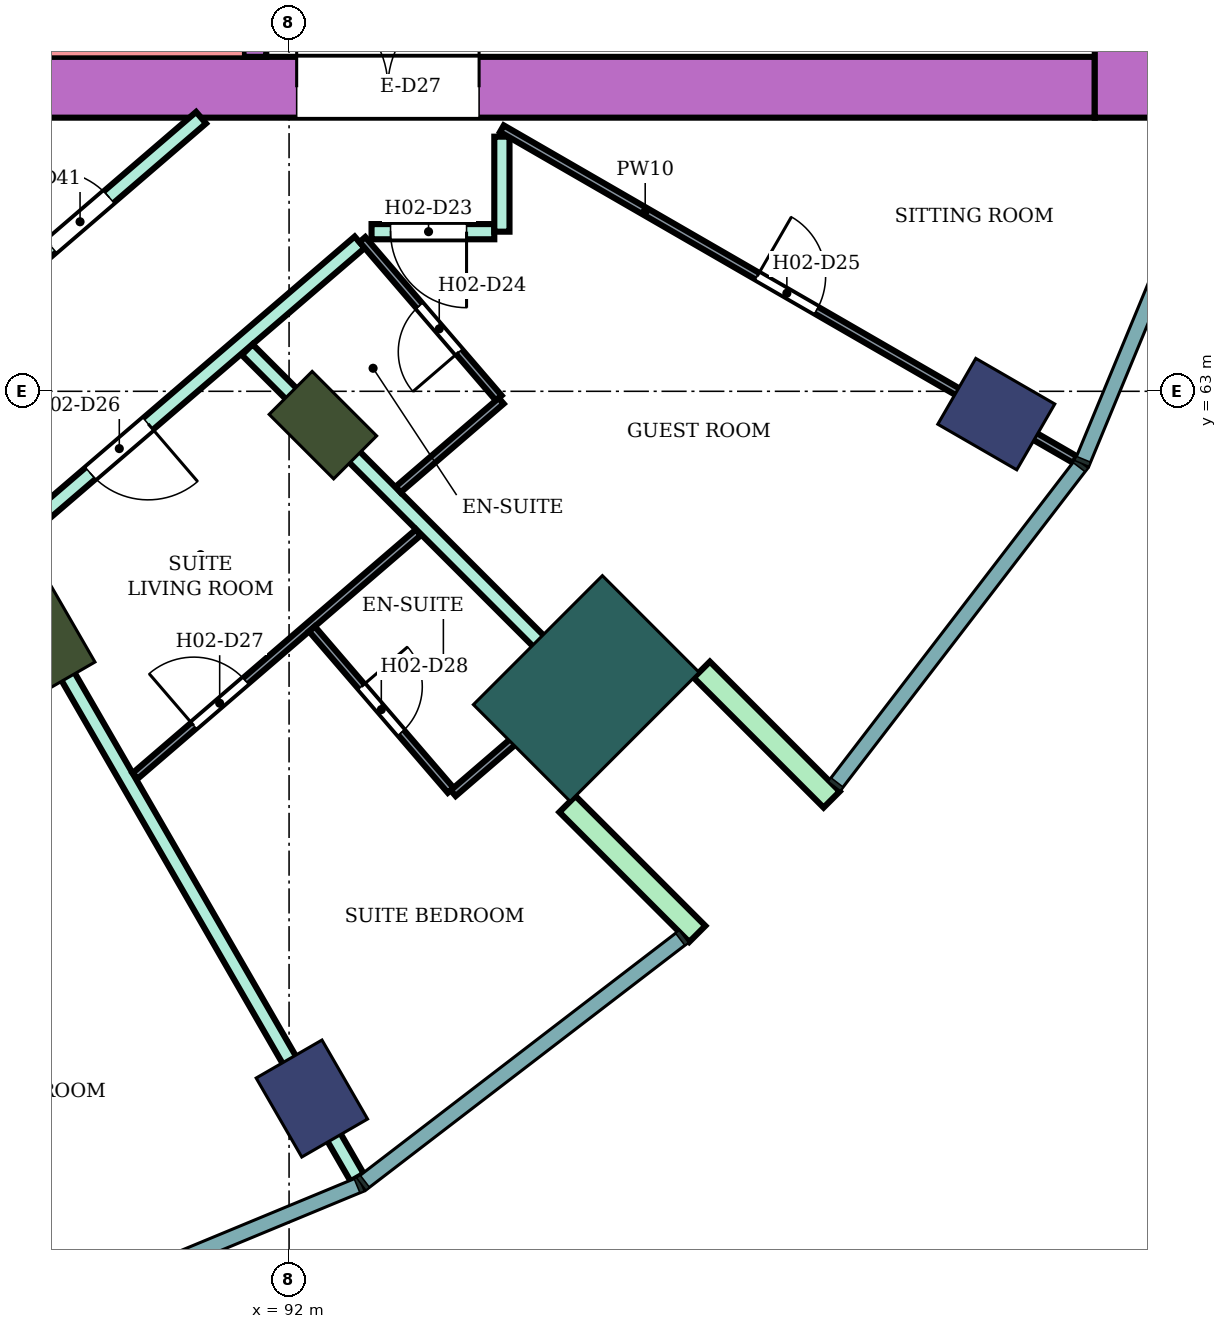
"""IFC4 building model, lengths in metres.
Left out: names, types, materials, properties, quantities, classifications, styles, units other than length and angle.
Written with IfcOpenShell. Run it as: python <this file> out.ifc"""

import sys

from ifc_helpers import new_model, si_unit, direction, frame, frame_2d, origin, origin_2d, place, context, subcontext, project, spatial, rectangle, extrude, element, fill, save


model = new_model("IFC4")
c1 = context("Model", 3, precision=1e-05, world=origin(), true_north=direction((0.0, 1.0)))
c2 = subcontext(c1, "Body", "Model", "MODEL_VIEW")
j1 = project(units=[si_unit("LENGTHUNIT", "METRE"), si_unit("PLANEANGLEUNIT", "RADIAN")], contexts=[c1])
p1 = place(None, origin())
s1 = spatial("IfcSite", under=j1, at=p1, CompositionType="ELEMENT")
p2 = place(p1, origin())
s2 = spatial("IfcBuilding", under=s1, at=p2, CompositionType="ELEMENT")
p3 = place(p2, frame((0.0, 0.0, 47.8)))
s3 = spatial("IfcBuildingStorey", under=s2, at=p3, CompositionType="ELEMENT", Elevation=47.8)
for number, where, z_axis, x_axis in (
    (1, (92.3, 53.696, 0.0), (0.0, 0.0, 1.0), (0.5, -0.866, 0.0)),
    (2, (101.304, 62.7, 0.0), (0.0, 0.0, 1.0), (0.866, -0.5, 0.0)),
):
    element("IfcColumn", number, at=place(p3, frame(where, z_axis=z_axis, x_axis=x_axis)), inside=s3, PredefinedType="COLUMN", context=c2, shape_type="SweptSolid", body=[
        extrude(rectangle(XDim=1.2, YDim=1.0, at=origin_2d()), origin(), (0.0, 0.0, 1.0), 3.8),
    ])
for number, where, z_axis, x_axis in (
    (3, (88.8, 59.758, 0.0), (0.0, 0.0, 1.0), (0.5, -0.866, 0.0)),
    (4, (92.445, 62.555, 0.0), (0.0, 0.0, 1.0), (0.707, -0.707, 0.0)),
):
    element("IfcColumn", number, at=place(p3, frame(where, z_axis=z_axis, x_axis=x_axis)), inside=s3, PredefinedType="COLUMN", context=c2, shape_type="SweptSolid", body=[
        extrude(rectangle(XDim=1.2, YDim=0.8, at=origin_2d()), origin(), (0.0, 0.0, 1.0), 3.8),
    ])
p4 = place(p3, frame((95.91, 59.09, 0.0), z_axis=(0.0, 0.0, 1.0), x_axis=(0.707106781187, -0.707106781187, 0.0)))
e5 = element("IfcColumn", 5, at=p4, inside=s3, PredefinedType="COLUMN", context=c2, shape_type="SweptSolid", body=[
    extrude(rectangle(XDim=1.8, YDim=2.4, at=origin_2d()), origin(), (0.0, 0.0, 1.0), 3.8),
])
p5 = place(p3, frame((87.9, 67.0, 0.0), z_axis=(0.0, 0.0, 1.0), x_axis=(1.0, 0.0, 0.0)))
e6 = element("IfcWall", 6, at=p5, inside=s3, PredefinedType="SHEAR", context=c2, shape_type="SweptSolid", body=[
    extrude(rectangle(XDim=14.7, YDim=0.8, at=frame_2d((7.35, 0.0))), origin(), (0.0, 0.0, 1.0), 3.48),
])
p6 = place(p5, frame((4.2, 0.0, 0.0)))
e7 = element("IfcOpeningElement", 7, at=p6, cuts=e6, PredefinedType="OPENING", context=c2, shape_type="SweptSolid", body=[
    extrude(rectangle(XDim=2.4, YDim=2.4, at=frame_2d((1.2, 1.2))), frame((0.0, 0.41, 0.0), z_axis=(0.0, -1.0, 0.0), x_axis=(1.0, 0.0, 0.0)), (0.0, 0.0, 1.0), 0.82),
])
p7 = place(p3, frame((103.0, 66.6, 0.0), z_axis=(0.0, 0.0, 1.0), x_axis=(0.0, 1.0, 0.0)))
e8 = element("IfcWall", 8, at=p7, inside=s3, PredefinedType="SHEAR", context=c2, shape_type="SweptSolid", body=[
    extrude(rectangle(XDim=16.8, YDim=0.8, at=frame_2d((8.4, 0.0))), origin(), (0.0, 0.0, 1.0), 3.48),
])
p8 = place(p3, frame((91.55, 67.4, 0.0), z_axis=(0.0, 0.0, 1.0), x_axis=(0.0, 1.0, 0.0)))
e9 = element("IfcWall", 9, at=p8, inside=s3, PredefinedType="SHEAR", context=c2, shape_type="SweptSolid", body=[
    extrude(rectangle(XDim=7.6, YDim=0.3, at=frame_2d((3.8, 0.0))), origin(), (0.0, 0.0, 1.0), 3.48),
])
p9 = place(p8, frame((0.25, 0.0, 0.0)))
e10 = element("IfcOpeningElement", 10, at=p9, cuts=e9, PredefinedType="OPENING", context=c2, shape_type="SweptSolid", body=[
    extrude(rectangle(XDim=0.9, YDim=2.1, at=frame_2d((0.45, 1.05))), frame((0.0, 0.16, 0.0), z_axis=(0.0, -1.0, 0.0), x_axis=(1.0, 0.0, 0.0)), (0.0, 0.0, 1.0), 0.32),
])
for number, where, z_axis, x_axis in (
    (11, (95.662, 57.57, 0.0), (0.0, 0.0, 1.0), (0.707, -0.707, 0.0)),
    (12, (97.43, 59.338, 0.0), (0.0, 0.0, 1.0), (0.707, -0.707, 0.0)),
):
    element("IfcWall", number, at=place(p3, frame(where, z_axis=z_axis, x_axis=x_axis)), inside=s3, PredefinedType="NOTDEFINED", context=c2, shape_type="SweptSolid", body=[
        extrude(rectangle(XDim=2.416, YDim=0.3, at=frame_2d((1.208, 0.0))), origin(), (0.0, 0.0, 1.0), 3.8),
    ])
p10 = place(p3, frame((86.877, 63.189, 0.0), z_axis=(0.0, 0.0, 1.0), x_axis=(0.758164888471, 0.652062881853, 0.0)))
e13 = element("IfcWall", 13, at=p10, inside=s3, PredefinedType="PARTITIONING", context=c2, shape_type="SweptSolid", body=[
    extrude(rectangle(XDim=5.23, YDim=0.2, at=frame_2d((2.615, 0.0))), origin(), (0.0, 0.0, 1.0), 3.35),
])
p11 = place(p10, frame((2.63, 0.0, 0.0)))
e14 = element("IfcOpeningElement", 14, at=p11, cuts=e13, PredefinedType="OPENING", context=c2, shape_type="SweptSolid", body=[
    extrude(rectangle(XDim=1.0, YDim=2.1, at=frame_2d((0.5, 1.05))), frame((0.0, 0.11, 0.0), z_axis=(0.0, -1.0, 0.0), x_axis=(1.0, 0.0, 0.0)), (0.0, 0.0, 1.0), 0.22),
])
p12 = place(p3, frame((88.235, 60.931, 0.0), z_axis=(0.0, 0.0, 1.0), x_axis=(0.758799498714, 0.651324282329, 0.0)))
e15 = element("IfcWall", 15, at=p12, inside=s3, PredefinedType="PARTITIONING", context=c2, shape_type="SweptSolid", body=[
    extrude(rectangle(XDim=6.186, YDim=0.2, at=frame_2d((3.093, 0.0))), origin(), (0.0, 0.0, 1.0), 3.35),
])
p13 = place(p12, frame((1.519, 0.0, 0.0)))
e16 = element("IfcOpeningElement", 16, at=p13, cuts=e15, PredefinedType="OPENING", context=c2, shape_type="SweptSolid", body=[
    extrude(rectangle(XDim=1.0, YDim=2.1, at=frame_2d((0.5, 1.05))), frame((0.0, 0.11, 0.0), z_axis=(0.0, -1.0, 0.0), x_axis=(1.0, 0.0, 0.0)), (0.0, 0.0, 1.0), 0.22),
])
p14 = place(p3, frame((88.159, 60.863, 0.0), z_axis=(0.0, 0.0, 1.0), x_axis=(0.499897184548, -0.866084756177, 0.0)))
e17 = element("IfcWall", 17, at=p14, inside=s3, PredefinedType="PARTITIONING", context=c2, shape_type="SweptSolid", body=[
    extrude(rectangle(XDim=9.475, YDim=0.2, at=frame_2d((4.737, 0.0))), origin(), (0.0, 0.0, 1.0), 3.35),
])
p15 = place(p3, frame((91.449, 63.548, 0.0), z_axis=(0.0, 0.0, 1.0), x_axis=(0.706984810649, -0.707228730688, 0.0)))
e18 = element("IfcWall", 18, at=p15, inside=s3, PredefinedType="PARTITIONING", context=c2, shape_type="SweptSolid", body=[
    extrude(rectangle(XDim=7.006, YDim=0.2, at=frame_2d((3.503, 0.0))), origin(), (0.0, 0.0, 1.0), 3.35),
])
p16 = place(p3, frame((93.085, 65.1, 0.0), z_axis=(0.0, 0.0, 1.0), x_axis=(1.0, 0.0, 0.0)))
e19 = element("IfcWall", 19, at=p16, inside=s3, PredefinedType="PARTITIONING", context=c2, shape_type="SweptSolid", body=[
    extrude(rectangle(XDim=1.615, YDim=0.2, at=frame_2d((0.808, 0.0))), origin(), (0.0, 0.0, 1.0), 3.35),
])
p17 = place(p16, frame((0.25, 0.0, 0.0)))
e20 = element("IfcOpeningElement", 20, at=p17, cuts=e19, PredefinedType="OPENING", context=c2, shape_type="SweptSolid", body=[
    extrude(rectangle(XDim=1.0, YDim=2.1, at=frame_2d((0.5, 1.05))), frame((0.0, 0.11, 0.0), z_axis=(0.0, -1.0, 0.0), x_axis=(1.0, 0.0, 0.0)), (0.0, 0.0, 1.0), 0.22),
])
p18 = place(p3, frame((94.8, 65.1, 0.0), z_axis=(0.0, 0.0, 1.0), x_axis=(0.0, 1.0, 0.0)))
e21 = element("IfcWall", 21, at=p18, inside=s3, PredefinedType="PARTITIONING", context=c2, shape_type="SweptSolid", body=[
    extrude(rectangle(XDim=1.25, YDim=0.2, at=frame_2d((0.625, 0.0))), origin(), (0.0, 0.0, 1.0), 3.35),
])
p19 = place(p3, frame((89.974, 57.94, 0.0), z_axis=(0.0, 0.0, 1.0), x_axis=(0.75821417454, 0.652005571699, 0.0)))
e22 = element("IfcWall", 22, at=p19, inside=s3, PredefinedType="PARTITIONING", context=c2, shape_type="SweptSolid", body=[
    extrude(rectangle(XDim=4.915, YDim=0.1, at=frame_2d((2.457, 0.0))), origin(), (0.0, 0.0, 1.0), 3.35),
])
p20 = place(p19, frame((1.017, 0.0, 0.0)))
e23 = element("IfcOpeningElement", 23, at=p20, cuts=e22, PredefinedType="OPENING", context=c2, shape_type="SweptSolid", body=[
    extrude(rectangle(XDim=0.9, YDim=2.1, at=frame_2d((0.45, 1.05))), frame((0.0, 0.06, 0.0), z_axis=(0.0, -1.0, 0.0), x_axis=(1.0, 0.0, 0.0)), (0.0, 0.0, 1.0), 0.12),
])
p21 = place(p3, frame((92.301, 59.874, 0.0), z_axis=(0.0, 0.0, 1.0), x_axis=(0.652061320562, -0.758166231262, 0.0)))
e24 = element("IfcWall", 24, at=p21, inside=s3, PredefinedType="PARTITIONING", context=c2, shape_type="SweptSolid", body=[
    extrude(rectangle(XDim=2.8, YDim=0.1, at=frame_2d((1.4, 0.0))), origin(), (0.0, 0.0, 1.0), 3.35),
])
p22 = place(p21, frame((1.0, 0.0, 0.0)))
e25 = element("IfcOpeningElement", 25, at=p22, cuts=e24, PredefinedType="OPENING", context=c2, shape_type="SweptSolid", body=[
    extrude(rectangle(XDim=0.8, YDim=2.1, at=frame_2d((0.4, 1.05))), frame((0.0, 0.06, 0.0), z_axis=(0.0, -1.0, 0.0), x_axis=(1.0, 0.0, 0.0)), (0.0, 0.0, 1.0), 0.12),
])
p23 = place(p3, frame((92.965, 64.997, 0.0), z_axis=(0.0, 0.0, 1.0), x_axis=(0.652069888227, -0.758158862553, 0.0)))
e26 = element("IfcWall", 26, at=p23, inside=s3, PredefinedType="PARTITIONING", context=c2, shape_type="SweptSolid", body=[
    extrude(rectangle(XDim=2.75, YDim=0.1, at=frame_2d((1.375, 0.0))), origin(), (0.0, 0.0, 1.0), 3.35),
])
p24 = place(p23, frame((1.15, 0.0, 0.0)))
e27 = element("IfcOpeningElement", 27, at=p24, cuts=e26, PredefinedType="OPENING", context=c2, shape_type="SweptSolid", body=[
    extrude(rectangle(XDim=0.8, YDim=2.1, at=frame_2d((0.4, 1.05))), frame((0.0, 0.06, 0.0), z_axis=(0.0, -1.0, 0.0), x_axis=(1.0, 0.0, 0.0)), (0.0, 0.0, 1.0), 0.12),
])
p25 = place(p3, frame((93.435, 61.707, 0.0), z_axis=(0.0, 0.0, 1.0), x_axis=(0.758070495124, 0.652172618578, 0.0)))
e28 = element("IfcWall", 28, at=p25, inside=s3, PredefinedType="PARTITIONING", context=c2, shape_type="SweptSolid", body=[
    extrude(rectangle(XDim=1.789, YDim=0.1, at=frame_2d((0.895, 0.0))), origin(), (0.0, 0.0, 1.0), 3.35),
])
p26 = place(p3, frame((94.159, 57.713, 0.0), z_axis=(0.0, 0.0, 1.0), x_axis=(0.75802950812, 0.652220257903, 0.0)))
e29 = element("IfcWall", 29, at=p26, inside=s3, PredefinedType="PARTITIONING", context=c2, shape_type="SweptSolid", body=[
    extrude(rectangle(XDim=2.109, YDim=0.1, at=frame_2d((1.054, 0.0))), origin(), (0.0, 0.0, 1.0), 3.35),
])
p27 = place(p3, frame((94.8, 66.455, 0.0), z_axis=(0.0, 0.0, 1.0), x_axis=(0.86602264145, -0.500004784474, 0.0)))
e30 = element("IfcWall", 30, at=p27, inside=s3, PredefinedType="PARTITIONING", context=c2, shape_type="SweptSolid", body=[
    extrude(rectangle(XDim=8.708, YDim=0.1, at=frame_2d((4.354, 0.0))), origin(), (0.0, 0.0, 1.0), 3.35),
])
p28 = place(p27, frame((3.879, 0.0, 0.0)))
e31 = element("IfcOpeningElement", 31, at=p28, cuts=e30, PredefinedType="OPENING", context=c2, shape_type="SweptSolid", body=[
    extrude(rectangle(XDim=0.9, YDim=2.1, at=frame_2d((0.45, 1.05))), frame((0.0, 0.06, 0.0), z_axis=(0.0, -1.0, 0.0), x_axis=(1.0, 0.0, 0.0)), (0.0, 0.0, 1.0), 0.12),
])
p29 = place(p17, frame((1.0, 0.0, 0.0), z_axis=(0.0, 0.0, 1.0), x_axis=(-1.0, 0.0, 0.0)))
e32 = element("IfcDoor", 32, at=p29, inside=s3, OperationType="SINGLE_SWING_LEFT", PredefinedType="DOOR", context=c2, shape_type="SweptSolid", body=[
    extrude(rectangle(XDim=1.0, YDim=2.1, at=frame_2d((0.5, 1.05))), frame((0.0, 0.025, 0.0), z_axis=(0.0, -1.0, 0.0), x_axis=(1.0, 0.0, 0.0)), (0.0, 0.0, 1.0), 0.05),
])
fill(e20, e32)
p30 = place(p24, frame((0.8, 0.0, 0.0), z_axis=(0.0, 0.0, 1.0), x_axis=(-1.0, 0.0, 0.0)))
e33 = element("IfcDoor", 33, at=p30, inside=s3, OperationType="SINGLE_SWING_LEFT", PredefinedType="DOOR", context=c2, shape_type="SweptSolid", body=[
    extrude(rectangle(XDim=0.8, YDim=2.1, at=frame_2d((0.4, 1.05))), frame((0.0, 0.025, 0.0), z_axis=(0.0, -1.0, 0.0), x_axis=(1.0, 0.0, 0.0)), (0.0, 0.0, 1.0), 0.05),
])
fill(e27, e33)
p31 = place(p28, origin())
e34 = element("IfcDoor", 34, at=p31, inside=s3, OperationType="SINGLE_SWING_LEFT", PredefinedType="DOOR", context=c2, shape_type="SweptSolid", body=[
    extrude(rectangle(XDim=0.9, YDim=2.1, at=frame_2d((0.45, 1.05))), frame((0.0, 0.025, 0.0), z_axis=(0.0, -1.0, 0.0), x_axis=(1.0, 0.0, 0.0)), (0.0, 0.0, 1.0), 0.05),
])
fill(e31, e34)
p32 = place(p13, frame((1.0, 0.0, 0.0), z_axis=(0.0, 0.0, 1.0), x_axis=(-1.0, 0.0, 0.0)))
e35 = element("IfcDoor", 35, at=p32, inside=s3, OperationType="SINGLE_SWING_LEFT", PredefinedType="DOOR", context=c2, shape_type="SweptSolid", body=[
    extrude(rectangle(XDim=1.0, YDim=2.1, at=frame_2d((0.5, 1.05))), frame((0.0, 0.025, 0.0), z_axis=(0.0, -1.0, 0.0), x_axis=(1.0, 0.0, 0.0)), (0.0, 0.0, 1.0), 0.05),
])
fill(e16, e35)
p33 = place(p20, origin())
e36 = element("IfcDoor", 36, at=p33, inside=s3, OperationType="SINGLE_SWING_LEFT", PredefinedType="DOOR", context=c2, shape_type="SweptSolid", body=[
    extrude(rectangle(XDim=0.9, YDim=2.1, at=frame_2d((0.45, 1.05))), frame((0.0, 0.025, 0.0), z_axis=(0.0, -1.0, 0.0), x_axis=(1.0, 0.0, 0.0)), (0.0, 0.0, 1.0), 0.05),
])
fill(e23, e36)
p34 = place(p22, origin())
e37 = element("IfcDoor", 37, at=p34, inside=s3, OperationType="SINGLE_SWING_LEFT", PredefinedType="DOOR", context=c2, shape_type="SweptSolid", body=[
    extrude(rectangle(XDim=0.8, YDim=2.1, at=frame_2d((0.4, 1.05))), frame((0.0, 0.025, 0.0), z_axis=(0.0, -1.0, 0.0), x_axis=(1.0, 0.0, 0.0)), (0.0, 0.0, 1.0), 0.05),
])
fill(e25, e37)
p35 = place(p11, origin())
e38 = element("IfcDoor", 38, at=p35, inside=s3, OperationType="SINGLE_SWING_LEFT", PredefinedType="DOOR", context=c2, shape_type="SweptSolid", body=[
    extrude(rectangle(XDim=1.0, YDim=2.1, at=frame_2d((0.5, 1.05))), frame((0.0, 0.025, 0.0), z_axis=(0.0, -1.0, 0.0), x_axis=(1.0, 0.0, 0.0)), (0.0, 0.0, 1.0), 0.05),
])
fill(e14, e38)
p36 = place(p6, origin())
e39 = element("IfcDoor", 39, at=p36, inside=s3, OperationType="DOUBLE_DOOR_SINGLE_SWING", PredefinedType="DOOR", context=c2, shape_type="SweptSolid", body=[
    extrude(rectangle(XDim=2.4, YDim=2.4, at=frame_2d((1.2, 1.2))), frame((0.0, 0.025, 0.0), z_axis=(0.0, -1.0, 0.0), x_axis=(1.0, 0.0, 0.0)), (0.0, 0.0, 1.0), 0.05),
])
fill(e7, e39)
save(model, sys.argv[1])
